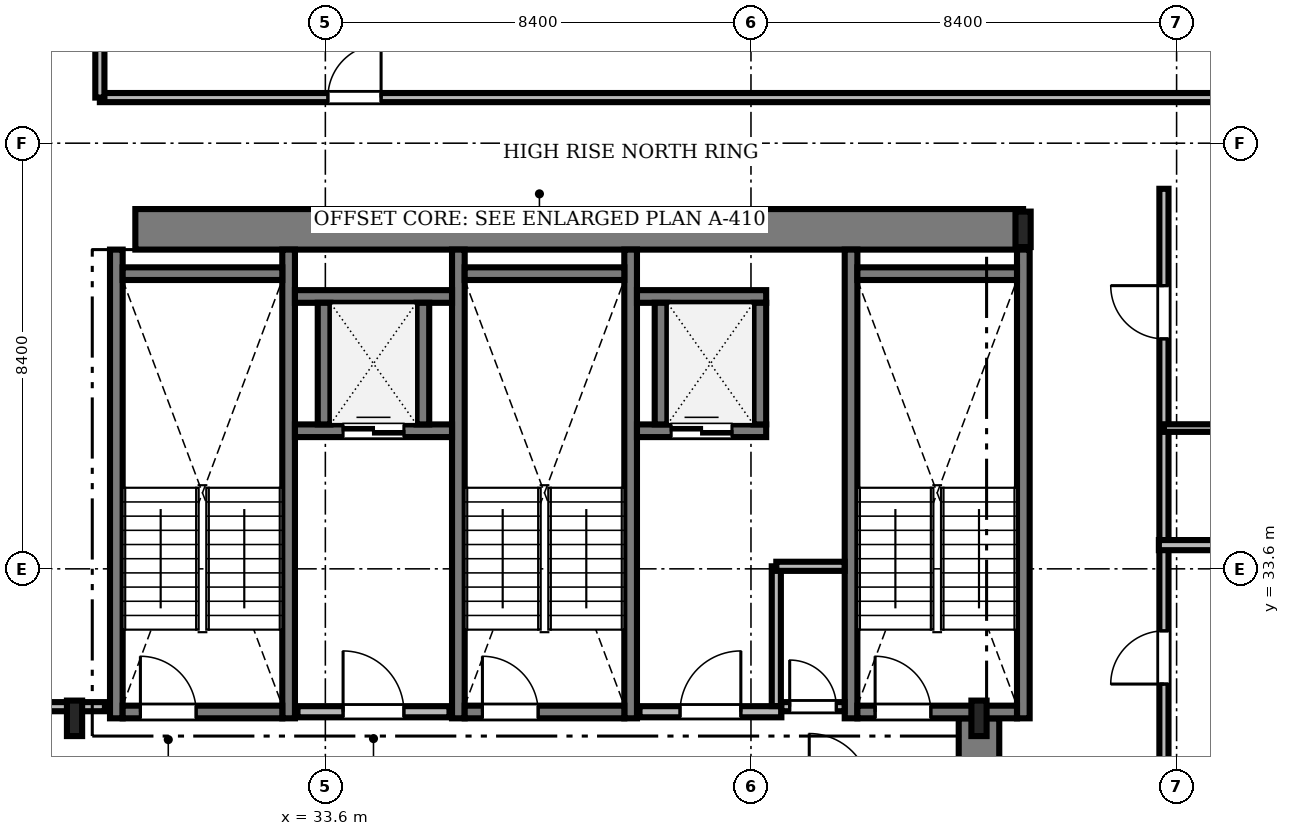
"""IFC4 building model, lengths in metres.
Left out: names, types, materials, properties, quantities, classifications, styles, units other than length and angle.
Written with IfcOpenShell. Run it as: python <this file> out.ifc"""

import sys

from ifc_helpers import new_model, si_unit, direction, frame, frame_2d, origin, origin_2d, place, context, subcontext, project, spatial, rectangle, i_section, extrude, source, transform, mapped, element, fill, save


model = new_model("IFC4")
c1 = context("Model", 3, precision=1e-05, world=origin(), true_north=direction((0.0, 1.0)))
c2 = subcontext(c1, "Body", "Model", "MODEL_VIEW")
j1 = project(units=[si_unit("LENGTHUNIT", "METRE"), si_unit("PLANEANGLEUNIT", "RADIAN")], contexts=[c1])
p1 = place(None, origin())
s1 = spatial("IfcSite", under=j1, at=p1, CompositionType="ELEMENT")
p2 = place(p1, origin())
s2 = spatial("IfcBuilding", under=s1, at=p2, CompositionType="ELEMENT")
p3 = place(p2, frame((0.0, 0.0, 199.8)))
s3 = spatial("IfcBuildingStorey", under=s2, at=p3, CompositionType="ELEMENT", Elevation=199.8)
m1 = source(origin(), c2, "Body", "SweptSolid", [
    extrude(rectangle(XDim=17.52, YDim=0.8, at=frame_2d((8.76, 0.0))), origin(), (0.0, 0.0, 1.0), 3.53),
])
p4 = place(p3, frame((29.85, 40.3, 0.0), z_axis=(0.0, 0.0, 1.0), x_axis=(1.0, 0.0, 0.0)))
e1 = element("IfcWall", 1, at=p4, inside=s3, PredefinedType="SHEAR", context=c2, shape_type="MappedRepresentation", body=[
    mapped(m1, transform((0.0, 0.0, 0.0), scale=1.0)),
])
m2 = source(origin(), c2, "Body", "SweptSolid", [
    extrude(rectangle(XDim=13.15, YDim=0.8, at=frame_2d((6.575, 0.0))), origin(), (0.0, 0.0, 1.0), 3.53),
])
p5 = place(p3, frame((46.5, 17.5, 0.0), z_axis=(0.0, 0.0, 1.0), x_axis=(0.0, 1.0, 0.0)))
e2 = element("IfcWall", 2, at=p5, inside=s3, PredefinedType="SHEAR", context=c2, shape_type="MappedRepresentation", body=[
    mapped(m2, transform((0.0, 0.0, 0.0), scale=1.0)),
])
m3 = source(origin(), c2, "Body", "SweptSolid", [
    extrude(i_section(OverallWidth=0.3, OverallDepth=0.7, WebThickness=0.017, FlangeThickness=0.032, FilletRadius=0.027, at=origin_2d()), origin(), (0.0, 0.0, 1.0), 3.53),
])
for number, where, z_axis, x_axis in (
    (3, (28.65, 30.65, 0.0), (0.0, 0.0, 1.0), (1.0, 0.0, 0.0)),
    (4, (46.5, 30.65, 0.0), (0.0, 0.0, 1.0), (1.0, 0.0, 0.0)),
    (5, (47.37, 40.3, 0.0), (0.0, 0.0, 1.0), (1.0, 0.0, 0.0)),
):
    element("IfcColumn", number, at=place(p3, frame(where, z_axis=z_axis, x_axis=x_axis)), inside=s3, PredefinedType="COLUMN", context=c2, shape_type="MappedRepresentation", body=[
        mapped(m3, transform((0.0, 0.0, 0.0), scale=1.0)),
    ])
m4 = source(origin(), c2, "Body", "SweptSolid", [
    extrude(rectangle(XDim=9.25, YDim=0.25, at=frame_2d((4.625, 0.0))), origin(), (0.0, 0.0, 1.0), 3.55),
])
for number, where, z_axis, x_axis in (
    (6, (29.475, 30.65, 0.0), (0.0, 0.0, 1.0), (0.0, 1.0, 0.0)),
    (7, (32.875, 30.65, 0.0), (0.0, 0.0, 1.0), (0.0, 1.0, 0.0)),
):
    element("IfcWall", number, at=place(p3, frame(where, z_axis=z_axis, x_axis=x_axis)), inside=s3, PredefinedType="SOLIDWALL", context=c2, shape_type="MappedRepresentation", body=[
        mapped(m4, transform((0.0, 0.0, 0.0), scale=1.0)),
    ])
m5 = source(origin(), c2, "Body", "SweptSolid", [
    extrude(rectangle(XDim=3.15, YDim=0.25, at=frame_2d((1.575, 0.0))), origin(), (0.0, 0.0, 1.0), 3.55),
])
p6 = place(p3, frame((29.6, 39.425, 0.0), z_axis=(0.0, 0.0, 1.0), x_axis=(1.0, 0.0, 0.0)))
e8 = element("IfcWall", 8, at=p6, inside=s3, PredefinedType="SOLIDWALL", context=c2, shape_type="MappedRepresentation", body=[
    mapped(m5, transform((0.0, 0.0, 0.0), scale=1.0)),
])
p7 = place(p3, frame((29.6, 30.775, 0.0), z_axis=(0.0, 0.0, 1.0), x_axis=(1.0, 0.0, 0.0)))
e9 = element("IfcWall", 9, at=p7, inside=s3, PredefinedType="SOLIDWALL", context=c2, shape_type="MappedRepresentation", body=[
    mapped(m5, transform((0.0, 0.0, 0.0), scale=1.0)),
])
m6 = source(origin(), c2, "Body", "SweptSolid", [
    extrude(rectangle(XDim=1.1, YDim=2.2, at=frame_2d((0.55, 1.1))), frame((0.0, 0.135, 0.0), z_axis=(0.0, -1.0, 0.0), x_axis=(1.0, 0.0, 0.0)), (0.0, 0.0, 1.0), 0.27),
])
p8 = place(p7, frame((0.35, 0.0, 0.0)))
e10 = element("IfcOpeningElement", 10, at=p8, cuts=e9, PredefinedType="OPENING", context=c2, shape_type="MappedRepresentation", body=[
    mapped(m6, transform((0.0, 0.0, 0.0), scale=1.0)),
])
for number, where, z_axis, x_axis in (
    (11, (36.225, 30.65, 0.0), (0.0, 0.0, 1.0), (0.0, 1.0, 0.0)),
    (12, (39.625, 30.65, 0.0), (0.0, 0.0, 1.0), (0.0, 1.0, 0.0)),
):
    element("IfcWall", number, at=place(p3, frame(where, z_axis=z_axis, x_axis=x_axis)), inside=s3, PredefinedType="SOLIDWALL", context=c2, shape_type="MappedRepresentation", body=[
        mapped(m4, transform((0.0, 0.0, 0.0), scale=1.0)),
    ])
p9 = place(p3, frame((36.35, 39.425, 0.0), z_axis=(0.0, 0.0, 1.0), x_axis=(1.0, 0.0, 0.0)))
e13 = element("IfcWall", 13, at=p9, inside=s3, PredefinedType="SOLIDWALL", context=c2, shape_type="MappedRepresentation", body=[
    mapped(m5, transform((0.0, 0.0, 0.0), scale=1.0)),
])
p10 = place(p3, frame((36.35, 30.775, 0.0), z_axis=(0.0, 0.0, 1.0), x_axis=(1.0, 0.0, 0.0)))
e14 = element("IfcWall", 14, at=p10, inside=s3, PredefinedType="SOLIDWALL", context=c2, shape_type="MappedRepresentation", body=[
    mapped(m5, transform((0.0, 0.0, 0.0), scale=1.0)),
])
p11 = place(p10, frame((0.35, 0.0, 0.0)))
e15 = element("IfcOpeningElement", 15, at=p11, cuts=e14, PredefinedType="OPENING", context=c2, shape_type="MappedRepresentation", body=[
    mapped(m6, transform((0.0, 0.0, 0.0), scale=1.0)),
])
for number, where, z_axis, x_axis in (
    (16, (43.975, 30.65, 0.0), (0.0, 0.0, 1.0), (0.0, 1.0, 0.0)),
    (17, (47.375, 30.65, 0.0), (0.0, 0.0, 1.0), (0.0, 1.0, 0.0)),
):
    element("IfcWall", number, at=place(p3, frame(where, z_axis=z_axis, x_axis=x_axis)), inside=s3, PredefinedType="SOLIDWALL", context=c2, shape_type="MappedRepresentation", body=[
        mapped(m4, transform((0.0, 0.0, 0.0), scale=1.0)),
    ])
p12 = place(p3, frame((44.1, 39.425, 0.0), z_axis=(0.0, 0.0, 1.0), x_axis=(1.0, 0.0, 0.0)))
e18 = element("IfcWall", 18, at=p12, inside=s3, PredefinedType="SOLIDWALL", context=c2, shape_type="MappedRepresentation", body=[
    mapped(m5, transform((0.0, 0.0, 0.0), scale=1.0)),
])
p13 = place(p3, frame((44.1, 30.775, 0.0), z_axis=(0.0, 0.0, 1.0), x_axis=(1.0, 0.0, 0.0)))
e19 = element("IfcWall", 19, at=p13, inside=s3, PredefinedType="SOLIDWALL", context=c2, shape_type="MappedRepresentation", body=[
    mapped(m5, transform((0.0, 0.0, 0.0), scale=1.0)),
])
p14 = place(p13, frame((0.35, 0.0, 0.0)))
e20 = element("IfcOpeningElement", 20, at=p14, cuts=e19, PredefinedType="OPENING", context=c2, shape_type="MappedRepresentation", body=[
    mapped(m6, transform((0.0, 0.0, 0.0), scale=1.0)),
])
m7 = source(origin(), c2, "Body", "SweptSolid", [
    extrude(rectangle(XDim=3.0, YDim=0.22, at=frame_2d((1.5, 0.0))), origin(), (0.0, 0.0, 1.0), 3.53),
])
p15 = place(p3, frame((33.05, 30.78, 0.0), z_axis=(0.0, 0.0, 1.0), x_axis=(1.0, 0.0, 0.0)))
e21 = element("IfcWall", 21, at=p15, inside=s3, PredefinedType="SOLIDWALL", context=c2, shape_type="MappedRepresentation", body=[
    mapped(m7, transform((0.0, 0.0, 0.0), scale=1.0)),
])
m8 = source(origin(), c2, "Body", "SweptSolid", [
    extrude(rectangle(XDim=1.2, YDim=2.2, at=frame_2d((0.6, 1.1))), frame((0.0, 0.12, 0.0), z_axis=(0.0, -1.0, 0.0), x_axis=(1.0, 0.0, 0.0)), (0.0, 0.0, 1.0), 0.24),
])
p16 = place(p15, frame((0.9, 0.0, 0.0)))
e22 = element("IfcOpeningElement", 22, at=p16, cuts=e21, PredefinedType="OPENING", context=c2, shape_type="MappedRepresentation", body=[
    mapped(m8, transform((0.0, 0.0, 0.0), scale=1.0)),
])
m9 = source(origin(), c2, "Body", "SweptSolid", [
    extrude(rectangle(XDim=2.8, YDim=0.22, at=frame_2d((1.4, 0.0))), origin(), (0.0, 0.0, 1.0), 3.53),
])
p17 = place(p3, frame((39.8, 30.78, 0.0), z_axis=(0.0, 0.0, 1.0), x_axis=(1.0, 0.0, 0.0)))
e23 = element("IfcWall", 23, at=p17, inside=s3, PredefinedType="SOLIDWALL", context=c2, shape_type="MappedRepresentation", body=[
    mapped(m9, transform((0.0, 0.0, 0.0), scale=1.0)),
])
p18 = place(p17, frame((0.8, 0.0, 0.0)))
e24 = element("IfcOpeningElement", 24, at=p18, cuts=e23, PredefinedType="OPENING", context=c2, shape_type="MappedRepresentation", body=[
    mapped(m8, transform((0.0, 0.0, 0.0), scale=1.0)),
])
m10 = source(origin(), c2, "Body", "SweptSolid", [
    extrude(rectangle(XDim=3.1, YDim=0.25, at=frame_2d((1.55, 0.0))), origin(), (0.0, 0.0, 1.0), 3.53),
])
p19 = place(p3, frame((33.0, 36.325, 0.0), z_axis=(0.0, 0.0, 1.0), x_axis=(1.0, 0.0, 0.0)))
e25 = element("IfcWall", 25, at=p19, inside=s3, PredefinedType="SOLIDWALL", context=c2, shape_type="MappedRepresentation", body=[
    mapped(m10, transform((0.0, 0.0, 0.0), scale=1.0)),
])
m11 = source(origin(), c2, "Body", "SweptSolid", [
    extrude(rectangle(XDim=1.2, YDim=2.25, at=frame_2d((0.6, 1.125))), frame((0.0, 0.135, 0.0), z_axis=(0.0, -1.0, 0.0), x_axis=(1.0, 0.0, 0.0)), (0.0, 0.0, 1.0), 0.27),
])
p20 = place(p19, frame((0.95, 0.0, 0.0)))
e26 = element("IfcOpeningElement", 26, at=p20, cuts=e25, PredefinedType="OPENING", context=c2, shape_type="MappedRepresentation", body=[
    mapped(m11, transform((0.0, 0.0, 0.0), scale=1.0)),
])
p21 = place(p3, frame((33.0, 38.975, 0.0), z_axis=(0.0, 0.0, 1.0), x_axis=(1.0, 0.0, 0.0)))
e27 = element("IfcWall", 27, at=p21, inside=s3, PredefinedType="SOLIDWALL", context=c2, shape_type="MappedRepresentation", body=[
    mapped(m10, transform((0.0, 0.0, 0.0), scale=1.0)),
])
m12 = source(origin(), c2, "Body", "SweptSolid", [
    extrude(rectangle(XDim=2.4, YDim=0.25, at=frame_2d((1.2, 0.0))), origin(), (0.0, 0.0, 1.0), 3.53),
])
for number, where, z_axis, x_axis in (
    (28, (33.575, 36.45, 0.0), (0.0, 0.0, 1.0), (0.0, 1.0, 0.0)),
    (29, (35.525, 36.45, 0.0), (0.0, 0.0, 1.0), (0.0, 1.0, 0.0)),
):
    element("IfcWall", number, at=place(p3, frame(where, z_axis=z_axis, x_axis=x_axis)), inside=s3, PredefinedType="SOLIDWALL", context=c2, shape_type="MappedRepresentation", body=[
        mapped(m12, transform((0.0, 0.0, 0.0), scale=1.0)),
    ])
m13 = source(origin(), c2, "Body", "SweptSolid", [
    extrude(rectangle(XDim=2.55, YDim=0.25, at=frame_2d((1.275, 0.0))), origin(), (0.0, 0.0, 1.0), 3.53),
])
p22 = place(p3, frame((39.75, 36.325, 0.0), z_axis=(0.0, 0.0, 1.0), x_axis=(1.0, 0.0, 0.0)))
e30 = element("IfcWall", 30, at=p22, inside=s3, PredefinedType="SOLIDWALL", context=c2, shape_type="MappedRepresentation", body=[
    mapped(m13, transform((0.0, 0.0, 0.0), scale=1.0)),
])
p23 = place(p22, frame((0.675, 0.0, 0.0)))
e31 = element("IfcOpeningElement", 31, at=p23, cuts=e30, PredefinedType="OPENING", context=c2, shape_type="MappedRepresentation", body=[
    mapped(m11, transform((0.0, 0.0, 0.0), scale=1.0)),
])
p24 = place(p3, frame((39.75, 38.975, 0.0), z_axis=(0.0, 0.0, 1.0), x_axis=(1.0, 0.0, 0.0)))
e32 = element("IfcWall", 32, at=p24, inside=s3, PredefinedType="SOLIDWALL", context=c2, shape_type="MappedRepresentation", body=[
    mapped(m13, transform((0.0, 0.0, 0.0), scale=1.0)),
])
for number, where, z_axis, x_axis in (
    (33, (40.225, 36.45, 0.0), (0.0, 0.0, 1.0), (0.0, 1.0, 0.0)),
    (34, (42.175, 36.45, 0.0), (0.0, 0.0, 1.0), (0.0, 1.0, 0.0)),
):
    element("IfcWall", number, at=place(p3, frame(where, z_axis=z_axis, x_axis=x_axis)), inside=s3, PredefinedType="SOLIDWALL", context=c2, shape_type="MappedRepresentation", body=[
        mapped(m12, transform((0.0, 0.0, 0.0), scale=1.0)),
    ])
m14 = source(origin(), c2, "Body", "SweptSolid", [
    extrude(rectangle(XDim=28.428, YDim=0.18, at=frame_2d((14.214, 0.0))), origin(), (0.0, 0.0, 1.0), 2.772),
])
p25 = place(p3, frame((29.15, 42.9, 0.0), z_axis=(0.0, 0.0, 1.0), x_axis=(1.0, 0.0, 0.0)))
e35 = element("IfcWall", 35, at=p25, inside=s3, PredefinedType="PARTITIONING", context=c2, shape_type="MappedRepresentation", body=[
    mapped(m14, transform((0.0, 0.0, 0.0), scale=1.0)),
])
m15 = source(origin(), c2, "Body", "SweptSolid", [
    extrude(rectangle(XDim=1.05, YDim=2.2, at=frame_2d((0.525, 1.1))), frame((0.0, 0.1, 0.0), z_axis=(0.0, -1.0, 0.0), x_axis=(1.0, 0.0, 0.0)), (0.0, 0.0, 1.0), 0.2),
])
p26 = place(p25, frame((4.5, 0.0, 0.0)))
e36 = element("IfcOpeningElement", 36, at=p26, cuts=e35, PredefinedType="OPENING", context=c2, shape_type="MappedRepresentation", body=[
    mapped(m15, transform((0.0, 0.0, 0.0), scale=1.0)),
])
m16 = source(origin(), c2, "Body", "SweptSolid", [
    extrude(rectangle(XDim=27.47, YDim=0.18, at=frame_2d((13.735, 0.0))), origin(), (0.0, 0.0, 1.0), 2.972),
])
p27 = place(p3, frame((50.15, 13.63, 0.0), z_axis=(0.0, 0.0, 1.0), x_axis=(0.0, 1.0, 0.0)))
e37 = element("IfcWall", 37, at=p27, inside=s3, PredefinedType="PARTITIONING", context=c2, shape_type="MappedRepresentation", body=[
    mapped(m16, transform((0.0, 0.0, 0.0), scale=1.0)),
])
p28 = place(p27, frame((4.071, 0.0, 0.0)))
e38 = element("IfcOpeningElement", 38, at=p28, cuts=e37, PredefinedType="OPENING", context=c2, shape_type="MappedRepresentation", body=[
    mapped(m15, transform((0.0, 0.0, 0.0), scale=1.0)),
])
p29 = place(p27, frame((10.884, 0.0, 0.0)))
e39 = element("IfcOpeningElement", 39, at=p29, cuts=e37, PredefinedType="OPENING", context=c2, shape_type="MappedRepresentation", body=[
    mapped(m15, transform((0.0, 0.0, 0.0), scale=1.0)),
])
p30 = place(p27, frame((17.696, 0.0, 0.0)))
e40 = element("IfcOpeningElement", 40, at=p30, cuts=e37, PredefinedType="OPENING", context=c2, shape_type="MappedRepresentation", body=[
    mapped(m15, transform((0.0, 0.0, 0.0), scale=1.0)),
])
p31 = place(p27, frame((24.509, 0.0, 0.0)))
e41 = element("IfcOpeningElement", 41, at=p31, cuts=e37, PredefinedType="OPENING", context=c2, shape_type="MappedRepresentation", body=[
    mapped(m15, transform((0.0, 0.0, 0.0), scale=1.0)),
])
m17 = source(origin(), c2, "Body", "SweptSolid", [
    extrude(rectangle(XDim=17.828, YDim=0.18, at=frame_2d((8.914, 0.0))), origin(), (0.0, 0.0, 1.0), 2.772),
])
p32 = place(p3, frame((11.422, 30.88, 0.0), z_axis=(0.0, 0.0, 1.0), x_axis=(1.0, 0.0, 0.0)))
e42 = element("IfcWall", 42, at=p32, inside=s3, PredefinedType="PARTITIONING", context=c2, shape_type="MappedRepresentation", body=[
    mapped(m17, transform((0.0, 0.0, 0.0), scale=1.0)),
])
p33 = place(p32, frame((10.778, 0.0, 0.0)))
e43 = element("IfcOpeningElement", 43, at=p33, cuts=e42, PredefinedType="OPENING", context=c2, shape_type="MappedRepresentation", body=[
    mapped(m15, transform((0.0, 0.0, 0.0), scale=1.0)),
])
m18 = source(origin(), c2, "Body", "SweptSolid", [
    extrude(rectangle(XDim=1.248, YDim=0.18, at=frame_2d((0.624, 0.0))), origin(), (0.0, 0.0, 1.0), 3.53),
])
p34 = place(p3, frame((42.6, 30.88, 0.0), z_axis=(0.0, 0.0, 1.0), x_axis=(1.0, 0.0, 0.0)))
e44 = element("IfcWall", 44, at=p34, inside=s3, PredefinedType="PARTITIONING", context=c2, shape_type="MappedRepresentation", body=[
    mapped(m18, transform((0.0, 0.0, 0.0), scale=1.0)),
])
m19 = source(origin(), c2, "Body", "SweptSolid", [
    extrude(rectangle(XDim=0.92, YDim=2.1, at=frame_2d((0.46, 1.05))), frame((0.0, 0.1, 0.0), z_axis=(0.0, -1.0, 0.0), x_axis=(1.0, 0.0, 0.0)), (0.0, 0.0, 1.0), 0.2),
])
p35 = place(p34, frame((0.164, 0.0, 0.0)))
e45 = element("IfcOpeningElement", 45, at=p35, cuts=e44, PredefinedType="OPENING", context=c2, shape_type="MappedRepresentation", body=[
    mapped(m19, transform((0.0, 0.0, 0.0), scale=1.0)),
])
m20 = source(origin(), c2, "Body", "SweptSolid", [
    extrude(rectangle(XDim=7.528, YDim=0.2, at=frame_2d((3.764, 0.0))), origin(), (0.0, 0.0, 1.0), 2.772),
])
p36 = place(p3, frame((50.05, 34.068, 0.0), z_axis=(0.0, 0.0, 1.0), x_axis=(1.0, 0.0, 0.0)))
e46 = element("IfcWall", 46, at=p36, inside=s3, PredefinedType="PARTITIONING", context=c2, shape_type="MappedRepresentation", body=[
    mapped(m20, transform((0.0, 0.0, 0.0), scale=1.0)),
])
m21 = source(origin(), c2, "Body", "SweptSolid", [
    extrude(rectangle(XDim=5.378, YDim=0.18, at=frame_2d((2.689, 0.0))), origin(), (0.0, 0.0, 1.0), 2.772),
])
p37 = place(p3, frame((29.15, 42.9, 0.0), z_axis=(0.0, 0.0, 1.0), x_axis=(0.0, 1.0, 0.0)))
e47 = element("IfcWall", 47, at=p37, inside=s3, PredefinedType="PARTITIONING", context=c2, shape_type="MappedRepresentation", body=[
    mapped(m21, transform((0.0, 0.0, 0.0), scale=1.0)),
])
m22 = source(origin(), c2, "Body", "SweptSolid", [
    extrude(rectangle(XDim=2.758, YDim=0.18, at=frame_2d((1.379, 0.0))), origin(), (0.0, 0.0, 1.0), 3.53),
])
p38 = place(p3, frame((42.5, 30.892, 0.0), z_axis=(0.0, 0.0, 1.0), x_axis=(0.0, 1.0, 0.0)))
e48 = element("IfcWall", 48, at=p38, inside=s3, PredefinedType="PARTITIONING", context=c2, shape_type="MappedRepresentation", body=[
    mapped(m22, transform((0.0, 0.0, 0.0), scale=1.0)),
])
m23 = source(origin(), c2, "Body", "SweptSolid", [
    extrude(rectangle(XDim=2.36, YDim=0.15, at=frame_2d((1.18, 0.0))), origin(), (0.0, 0.0, 1.0), 3.53),
])
p39 = place(p3, frame((50.15, 36.378, 0.0), z_axis=(0.0, 0.0, 1.0), x_axis=(1.0, 0.0, 0.0)))
e49 = element("IfcWall", 49, at=p39, inside=s3, PredefinedType="PARTITIONING", context=c2, shape_type="MappedRepresentation", body=[
    mapped(m23, transform((0.0, 0.0, 0.0), scale=1.0)),
])
m24 = source(origin(), c2, "Body", "SweptSolid", [
    extrude(rectangle(XDim=1.348, YDim=0.18, at=frame_2d((0.674, 0.0))), origin(), (0.0, 0.0, 1.0), 3.53),
])
p40 = place(p3, frame((42.5, 33.65, 0.0), z_axis=(0.0, 0.0, 1.0), x_axis=(1.0, 0.0, 0.0)))
e50 = element("IfcWall", 50, at=p40, inside=s3, PredefinedType="PARTITIONING", context=c2, shape_type="MappedRepresentation", body=[
    mapped(m24, transform((0.0, 0.0, 0.0), scale=1.0)),
])
m25 = source(origin(), c2, "Body", "SweptSolid", [
    extrude(rectangle(XDim=1.1, YDim=2.2, at=frame_2d((0.55, 1.1))), frame((0.0, 0.025, 0.0), z_axis=(0.0, -1.0, 0.0), x_axis=(1.0, 0.0, 0.0)), (0.0, 0.0, 1.0), 0.05),
])
p41 = place(p8, origin())
e51 = element("IfcDoor", 51, at=p41, inside=s3, OperationType="SINGLE_SWING_LEFT", PredefinedType="DOOR", context=c2, shape_type="MappedRepresentation", body=[
    mapped(m25, transform((0.0, 0.0, 0.0), scale=1.0)),
])
fill(e10, e51)
p42 = place(p11, origin())
e52 = element("IfcDoor", 52, at=p42, inside=s3, OperationType="SINGLE_SWING_LEFT", PredefinedType="DOOR", context=c2, shape_type="MappedRepresentation", body=[
    mapped(m25, transform((0.0, 0.0, 0.0), scale=1.0)),
])
fill(e15, e52)
p43 = place(p14, origin())
e53 = element("IfcDoor", 53, at=p43, inside=s3, OperationType="SINGLE_SWING_LEFT", PredefinedType="DOOR", context=c2, shape_type="MappedRepresentation", body=[
    mapped(m25, transform((0.0, 0.0, 0.0), scale=1.0)),
])
fill(e20, e53)
m26 = source(origin(), c2, "Body", "SweptSolid", [
    extrude(rectangle(XDim=1.2, YDim=2.2, at=frame_2d((0.6, 1.1))), frame((0.0, 0.025, 0.0), z_axis=(0.0, -1.0, 0.0), x_axis=(1.0, 0.0, 0.0)), (0.0, 0.0, 1.0), 0.05),
])
p44 = place(p16, origin())
e54 = element("IfcDoor", 54, at=p44, inside=s3, OperationType="SINGLE_SWING_LEFT", PredefinedType="DOOR", context=c2, shape_type="MappedRepresentation", body=[
    mapped(m26, transform((0.0, 0.0, 0.0), scale=1.0)),
])
fill(e22, e54)
p45 = place(p18, origin())
e55 = element("IfcDoor", 55, at=p45, inside=s3, OperationType="SINGLE_SWING_RIGHT", PredefinedType="DOOR", context=c2, shape_type="MappedRepresentation", body=[
    mapped(m26, transform((0.0, 0.0, 0.0), scale=1.0)),
])
fill(e24, e55)
m27 = source(origin(), c2, "Body", "SweptSolid", [
    extrude(rectangle(XDim=1.2, YDim=2.25, at=frame_2d((0.6, 1.125))), frame((0.0, 0.025, 0.0), z_axis=(0.0, -1.0, 0.0), x_axis=(1.0, 0.0, 0.0)), (0.0, 0.0, 1.0), 0.05),
])
p46 = place(p20, origin())
e56 = element("IfcDoor", 56, at=p46, inside=s3, OperationType="DOUBLE_DOOR_SLIDING", PredefinedType="DOOR", context=c2, shape_type="MappedRepresentation", body=[
    mapped(m27, transform((0.0, 0.0, 0.0), scale=1.0)),
])
fill(e26, e56)
p47 = place(p23, origin())
e57 = element("IfcDoor", 57, at=p47, inside=s3, OperationType="DOUBLE_DOOR_SLIDING", PredefinedType="DOOR", context=c2, shape_type="MappedRepresentation", body=[
    mapped(m27, transform((0.0, 0.0, 0.0), scale=1.0)),
])
fill(e31, e57)
m28 = source(origin(), c2, "Body", "SweptSolid", [
    extrude(rectangle(XDim=1.05, YDim=2.2, at=frame_2d((0.525, 1.1))), frame((0.0, 0.025, 0.0), z_axis=(0.0, -1.0, 0.0), x_axis=(1.0, 0.0, 0.0)), (0.0, 0.0, 1.0), 0.05),
])
p48 = place(p26, origin())
e58 = element("IfcDoor", 58, at=p48, inside=s3, OperationType="SINGLE_SWING_RIGHT", PredefinedType="DOOR", context=c2, shape_type="MappedRepresentation", body=[
    mapped(m28, transform((0.0, 0.0, 0.0), scale=1.0)),
])
fill(e36, e58)
p49 = place(p30, origin())
e59 = element("IfcDoor", 59, at=p49, inside=s3, OperationType="SINGLE_SWING_LEFT", PredefinedType="DOOR", context=c2, shape_type="MappedRepresentation", body=[
    mapped(m28, transform((0.0, 0.0, 0.0), scale=1.0)),
])
fill(e40, e59)
p50 = place(p31, origin())
e60 = element("IfcDoor", 60, at=p50, inside=s3, OperationType="SINGLE_SWING_RIGHT", PredefinedType="DOOR", context=c2, shape_type="MappedRepresentation", body=[
    mapped(m28, transform((0.0, 0.0, 0.0), scale=1.0)),
])
fill(e41, e60)
m29 = source(origin(), c2, "Body", "SweptSolid", [
    extrude(rectangle(XDim=0.92, YDim=2.1, at=frame_2d((0.46, 1.05))), frame((0.0, 0.025, 0.0), z_axis=(0.0, -1.0, 0.0), x_axis=(1.0, 0.0, 0.0)), (0.0, 0.0, 1.0), 0.05),
])
p51 = place(p35, origin())
e61 = element("IfcDoor", 61, at=p51, inside=s3, OperationType="SINGLE_SWING_LEFT", PredefinedType="DOOR", context=c2, shape_type="MappedRepresentation", body=[
    mapped(m29, transform((0.0, 0.0, 0.0), scale=1.0)),
])
fill(e45, e61)
save(model, sys.argv[1])
